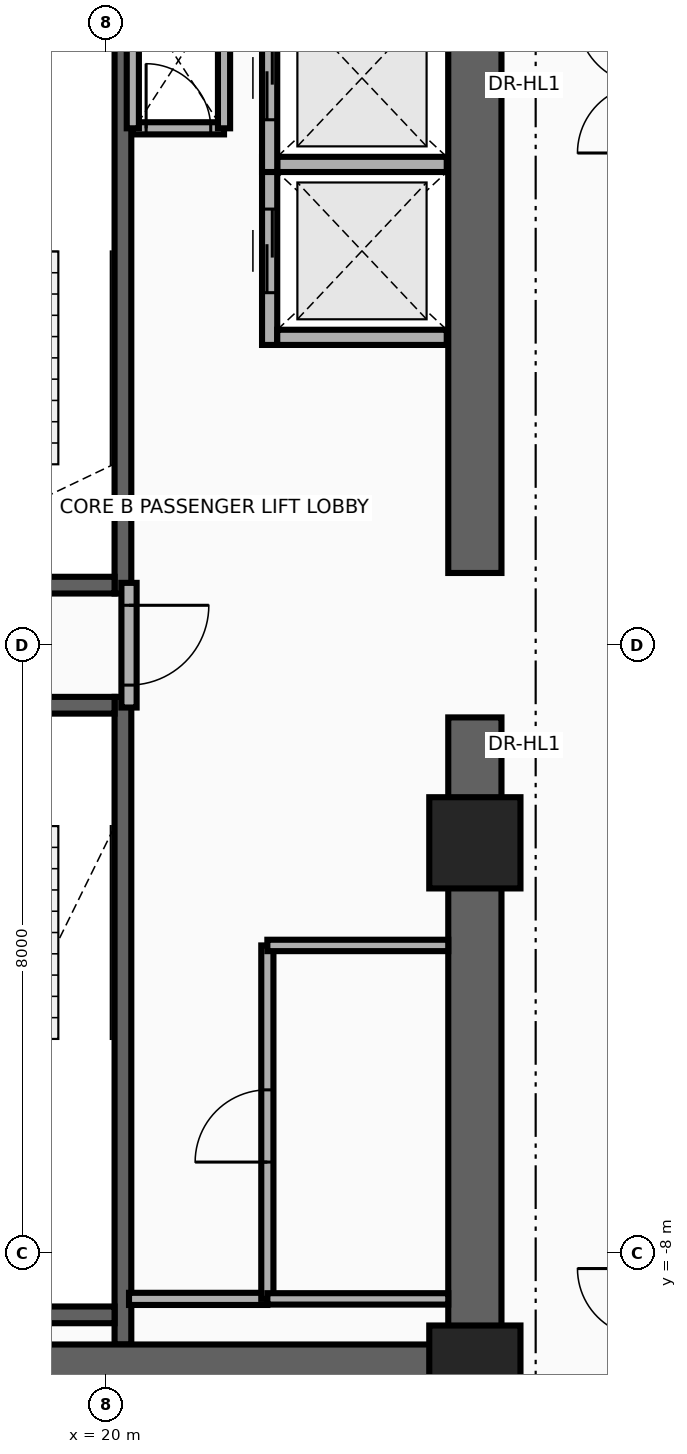
"""IFC4 building model, lengths in metres.
Left out: names, types, materials, properties, quantities, classifications, styles, units other than length and angle.
Written with IfcOpenShell. Run it as: python <this file> out.ifc"""

import sys

from ifc_helpers import new_model, si_unit, direction, frame, frame_2d, origin, origin_2d, place, context, subcontext, project, spatial, rectangle, extrude, source, transform, mapped, element, fill, save


model = new_model("IFC4")
c1 = context("Model", 3, precision=1e-05, world=origin(), true_north=direction((0.0, 1.0)))
c2 = subcontext(c1, "Body", "Model", "MODEL_VIEW")
j1 = project(units=[si_unit("LENGTHUNIT", "METRE"), si_unit("PLANEANGLEUNIT", "RADIAN")], contexts=[c1])
p1 = place(None, origin())
s1 = spatial("IfcSite", under=j1, at=p1, CompositionType="ELEMENT")
p2 = place(p1, origin())
s2 = spatial("IfcBuilding", under=s1, at=p2, CompositionType="ELEMENT")
p3 = place(p2, frame((0.0, 0.0, 127.9)))
s3 = spatial("IfcBuildingStorey", under=s2, at=p3, CompositionType="ELEMENT", Elevation=127.9)
p4 = place(p3, frame((20.22, 0.68, 0.0), z_axis=(0.0, 0.0, 1.0), x_axis=(0.0, 1.0, 0.0)))
e1 = element("IfcWall", 1, at=p4, inside=s3, PredefinedType="SHEAR", context=c2, shape_type="SweptSolid", body=[
    extrude(rectangle(XDim=8.52, YDim=0.22, at=frame_2d((4.26, 0.0))), origin(), (0.0, 0.0, 1.0), 3.46),
])
p5 = place(p3, frame((17.0, 0.79, 0.0), z_axis=(0.0, 0.0, 1.0), x_axis=(1.0, 0.0, 0.0)))
e2 = element("IfcWall", 2, at=p5, inside=s3, PredefinedType="SHEAR", context=c2, shape_type="SweptSolid", body=[
    extrude(rectangle(XDim=3.11, YDim=0.22, at=frame_2d((1.555, 0.0))), origin(), (0.0, 0.0, 1.0), 3.46),
])
p6 = place(p5, frame((0.95, 0.0, 0.0)))
e3 = element("IfcOpeningElement", 3, at=p6, cuts=e2, PredefinedType="OPENING", context=c2, shape_type="SweptSolid", body=[
    extrude(rectangle(XDim=1.1, YDim=2.15, at=frame_2d((0.55, 1.075))), frame((0.0, 0.125, 0.0), z_axis=(0.0, -1.0, 0.0), x_axis=(1.0, 0.0, 0.0)), (0.0, 0.0, 1.0), 0.25),
])
p7 = place(p3, frame((20.22, -9.2, 0.0), z_axis=(0.0, 0.0, 1.0), x_axis=(0.0, 1.0, 0.0)))
e4 = element("IfcWall", 4, at=p7, inside=s3, PredefinedType="SHEAR", context=c2, shape_type="SweptSolid", body=[
    extrude(rectangle(XDim=8.52, YDim=0.22, at=frame_2d((4.26, 0.0))), origin(), (0.0, 0.0, 1.0), 3.46),
])
p8 = place(p3, frame((17.0, -8.81, 0.0), z_axis=(0.0, 0.0, 1.0), x_axis=(1.0, 0.0, 0.0)))
e5 = element("IfcWall", 5, at=p8, inside=s3, PredefinedType="SHEAR", context=c2, shape_type="SweptSolid", body=[
    extrude(rectangle(XDim=3.11, YDim=0.22, at=frame_2d((1.555, 0.0))), origin(), (0.0, 0.0, 1.0), 3.46),
])
p9 = place(p3, frame((17.0, -0.79, 0.0), z_axis=(0.0, 0.0, 1.0), x_axis=(1.0, 0.0, 0.0)))
e6 = element("IfcWall", 6, at=p9, inside=s3, PredefinedType="SHEAR", context=c2, shape_type="SweptSolid", body=[
    extrude(rectangle(XDim=3.11, YDim=0.22, at=frame_2d((1.555, 0.0))), origin(), (0.0, 0.0, 1.0), 3.46),
])
p10 = place(p9, frame((0.95, 0.0, 0.0)))
e7 = element("IfcOpeningElement", 7, at=p10, cuts=e6, PredefinedType="OPENING", context=c2, shape_type="SweptSolid", body=[
    extrude(rectangle(XDim=1.1, YDim=2.15, at=frame_2d((0.55, 1.075))), frame((0.0, 0.125, 0.0), z_axis=(0.0, -1.0, 0.0), x_axis=(1.0, 0.0, 0.0)), (0.0, 0.0, 1.0), 0.25),
])
for number, where, z_axis, x_axis in (
    (8, (24.85, -9.9, 0.0), (0.0, 0.0, 1.0), (0.0, 1.0, 0.0)),
    (9, (24.85, 0.95, 0.0), (0.0, 0.0, 1.0), (0.0, 1.0, 0.0)),
):
    element("IfcWall", number, at=place(p3, frame(where, z_axis=z_axis, x_axis=x_axis)), inside=s3, PredefinedType="SHEAR", context=c2, shape_type="SweptSolid", body=[
        extrude(rectangle(XDim=8.95, YDim=0.7, at=frame_2d((4.475, 0.0))), origin(), (0.0, 0.0, 1.0), 3.46),
    ])
p11 = place(p3, frame((15.85, -9.55, 0.0), z_axis=(0.0, 0.0, 1.0), x_axis=(1.0, 0.0, 0.0)))
e10 = element("IfcWall", 10, at=p11, inside=s3, PredefinedType="SHEAR", context=c2, shape_type="SweptSolid", body=[
    extrude(rectangle(XDim=9.0, YDim=0.7, at=frame_2d((4.5, 0.0))), origin(), (0.0, 0.0, 1.0), 3.46),
])
m1 = source(origin(), c2, "Body", "SweptSolid", [
    extrude(rectangle(XDim=1.2, YDim=1.2, at=origin_2d()), origin(), (0.0, 0.0, 1.0), 3.7),
])
for number, where, z_axis, x_axis in (
    (11, (24.85, -9.55, 0.0), (0.0, 0.0, 1.0), (1.0, 0.0, 0.0)),
    (12, (24.85, -2.6, 0.0), (0.0, 0.0, 1.0), (1.0, 0.0, 0.0)),
):
    element("IfcColumn", number, at=place(p3, frame(where, z_axis=z_axis, x_axis=x_axis)), inside=s3, PredefinedType="COLUMN", context=c2, shape_type="MappedRepresentation", body=[
        mapped(m1, transform((0.0, 0.0, 0.0), x_axis=(1.0, 0.0, 0.0), y_axis=(0.0, 1.0, 0.0), z_axis=(0.0, 0.0, 1.0), scale=1.0)),
    ])
p12 = place(p3, frame((22.15, 3.95, 0.0), z_axis=(0.0, 0.0, 1.0), x_axis=(0.0, 1.0, 0.0)))
e13 = element("IfcWall", 13, at=p12, inside=s3, PredefinedType="MOVABLE", context=c2, shape_type="SweptSolid", body=[
    extrude(rectangle(XDim=2.475, YDim=0.2, at=frame_2d((1.238, 0.0))), origin(), (0.0, 0.0, 1.0), 3.46),
])
p13 = place(p12, frame((0.688, 0.0, 0.0)))
e14 = element("IfcOpeningElement", 14, at=p13, cuts=e13, PredefinedType="OPENING", context=c2, shape_type="SweptSolid", body=[
    extrude(rectangle(XDim=1.1, YDim=2.1, at=frame_2d((0.55, 1.05))), frame((0.0, 0.115, 0.0), z_axis=(0.0, -1.0, 0.0), x_axis=(1.0, 0.0, 0.0)), (0.0, 0.0, 1.0), 0.23),
])
for number, where, z_axis, x_axis in (
    (15, (22.25, 4.05, 0.0), (0.0, 0.0, 1.0), (1.0, 0.0, 0.0)),
    (16, (22.25, 6.325, 0.0), (0.0, 0.0, 1.0), (1.0, 0.0, 0.0)),
):
    element("IfcWall", number, at=place(p3, frame(where, z_axis=z_axis, x_axis=x_axis)), inside=s3, PredefinedType="MOVABLE", context=c2, shape_type="SweptSolid", body=[
        extrude(rectangle(XDim=2.23, YDim=0.2, at=frame_2d((1.115, 0.0))), origin(), (0.0, 0.0, 1.0), 2.245),
    ])
p14 = place(p3, frame((22.15, 6.225, 0.0), z_axis=(0.0, 0.0, 1.0), x_axis=(0.0, 1.0, 0.0)))
e17 = element("IfcWall", 17, at=p14, inside=s3, PredefinedType="MOVABLE", context=c2, shape_type="SweptSolid", body=[
    extrude(rectangle(XDim=2.475, YDim=0.2, at=frame_2d((1.237, 0.0))), origin(), (0.0, 0.0, 1.0), 3.46),
])
p15 = place(p14, frame((0.688, 0.0, 0.0)))
e18 = element("IfcOpeningElement", 18, at=p15, cuts=e17, PredefinedType="OPENING", context=c2, shape_type="SweptSolid", body=[
    extrude(rectangle(XDim=1.1, YDim=2.1, at=frame_2d((0.55, 1.05))), frame((0.0, 0.115, 0.0), z_axis=(0.0, -1.0, 0.0), x_axis=(1.0, 0.0, 0.0)), (0.0, 0.0, 1.0), 0.23),
])
p16 = place(p3, frame((20.3, -0.82, 0.0), z_axis=(0.0, 0.0, 1.0), x_axis=(0.0, 1.0, 0.0)))
e19 = element("IfcWall", 19, at=p16, inside=s3, PredefinedType="PARTITIONING", context=c2, shape_type="SweptSolid", body=[
    extrude(rectangle(XDim=1.64, YDim=0.2, at=frame_2d((0.82, 0.0))), origin(), (0.0, 0.0, 1.0), 3.46),
])
p17 = place(p16, frame((0.295, 0.0, 0.0)))
e20 = element("IfcOpeningElement", 20, at=p17, cuts=e19, PredefinedType="OPENING", context=c2, shape_type="SweptSolid", body=[
    extrude(rectangle(XDim=1.05, YDim=2.15, at=frame_2d((0.525, 1.075))), frame((0.0, 0.115, 0.0), z_axis=(0.0, -1.0, 0.0), x_axis=(1.0, 0.0, 0.0)), (0.0, 0.0, 1.0), 0.23),
])
p18 = place(p3, frame((20.35, 6.8, 0.0), z_axis=(0.0, 0.0, 1.0), x_axis=(1.0, 0.0, 0.0)))
e21 = element("IfcWall", 21, at=p18, inside=s3, PredefinedType="PARTITIONING", context=c2, shape_type="SweptSolid", body=[
    extrude(rectangle(XDim=1.2, YDim=0.16, at=frame_2d((0.6, 0.0))), origin(), (0.0, 0.0, 1.0), 3.46),
])
p19 = place(p18, frame((0.175, 0.0, 0.0)))
e22 = element("IfcOpeningElement", 22, at=p19, cuts=e21, PredefinedType="OPENING", context=c2, shape_type="SweptSolid", body=[
    extrude(rectangle(XDim=0.85, YDim=2.05, at=frame_2d((0.425, 1.025))), frame((0.0, 0.095, 0.0), z_axis=(0.0, -1.0, 0.0), x_axis=(1.0, 0.0, 0.0)), (0.0, 0.0, 1.0), 0.19),
])
for number, where, z_axis, x_axis in (
    (23, (21.55, 6.8, 0.0), (0.0, 0.0, 1.0), (0.0, 1.0, 0.0)),
    (24, (20.35, 6.8, 0.0), (0.0, 0.0, 1.0), (0.0, 1.0, 0.0)),
):
    element("IfcWall", number, at=place(p3, frame(where, z_axis=z_axis, x_axis=x_axis)), inside=s3, PredefinedType="PARTITIONING", context=c2, shape_type="SweptSolid", body=[
        extrude(rectangle(XDim=1.8, YDim=0.16, at=frame_2d((0.9, 0.0))), origin(), (0.0, 0.0, 1.0), 3.46),
    ])
p20 = place(p3, frame((20.3, -8.6, 0.0), z_axis=(0.0, 0.0, 1.0), x_axis=(1.0, 0.0, 0.0)))
e25 = element("IfcWall", 25, at=p20, inside=s3, PredefinedType="PARTITIONING", context=c2, shape_type="SweptSolid", body=[
    extrude(rectangle(XDim=1.82, YDim=0.16, at=frame_2d((0.91, 0.0))), origin(), (0.0, 0.0, 1.0), 3.46),
])
p21 = place(p3, frame((22.12, -8.6, 0.0), z_axis=(0.0, 0.0, 1.0), x_axis=(0.0, 1.0, 0.0)))
e26 = element("IfcWall", 26, at=p21, inside=s3, PredefinedType="PARTITIONING", context=c2, shape_type="SweptSolid", body=[
    extrude(rectangle(XDim=4.65, YDim=0.16, at=frame_2d((2.325, 0.0))), origin(), (0.0, 0.0, 1.0), 3.46),
])
p22 = place(p21, frame((1.8, 0.0, 0.0)))
e27 = element("IfcOpeningElement", 27, at=p22, cuts=e26, PredefinedType="OPENING", context=c2, shape_type="SweptSolid", body=[
    extrude(rectangle(XDim=0.95, YDim=2.15, at=frame_2d((0.475, 1.075))), frame((0.0, 0.095, 0.0), z_axis=(0.0, -1.0, 0.0), x_axis=(1.0, 0.0, 0.0)), (0.0, 0.0, 1.0), 0.19),
])
for number, where, z_axis, x_axis in (
    (28, (22.12, -3.95, 0.0), (0.0, 0.0, 1.0), (1.0, 0.0, 0.0)),
    (29, (22.12, -8.6, 0.0), (0.0, 0.0, 1.0), (1.0, 0.0, 0.0)),
):
    element("IfcWall", number, at=place(p3, frame(where, z_axis=z_axis, x_axis=x_axis)), inside=s3, PredefinedType="PARTITIONING", context=c2, shape_type="SweptSolid", body=[
        extrude(rectangle(XDim=2.38, YDim=0.15, at=frame_2d((1.19, 0.0))), origin(), (0.0, 0.0, 1.0), 3.46),
    ])
p23 = place(p13, origin())
e30 = element("IfcDoor", 30, at=p23, inside=s3, OperationType="DOUBLE_DOOR_SLIDING", PredefinedType="DOOR", context=c2, shape_type="SweptSolid", body=[
    extrude(rectangle(XDim=1.1, YDim=2.1, at=frame_2d((0.55, 1.05))), frame((0.0, 0.025, 0.0), z_axis=(0.0, -1.0, 0.0), x_axis=(1.0, 0.0, 0.0)), (0.0, 0.0, 1.0), 0.05),
])
fill(e14, e30)
p24 = place(p15, origin())
e31 = element("IfcDoor", 31, at=p24, inside=s3, OperationType="DOUBLE_DOOR_SLIDING", PredefinedType="DOOR", context=c2, shape_type="SweptSolid", body=[
    extrude(rectangle(XDim=1.1, YDim=2.1, at=frame_2d((0.55, 1.05))), frame((0.0, 0.025, 0.0), z_axis=(0.0, -1.0, 0.0), x_axis=(1.0, 0.0, 0.0)), (0.0, 0.0, 1.0), 0.05),
])
fill(e18, e31)
p25 = place(p17, frame((1.05, 0.0, 0.0), z_axis=(0.0, 0.0, 1.0), x_axis=(-1.0, 0.0, 0.0)))
e32 = element("IfcDoor", 32, at=p25, inside=s3, OperationType="SINGLE_SWING_LEFT", PredefinedType="DOOR", context=c2, shape_type="SweptSolid", body=[
    extrude(rectangle(XDim=1.05, YDim=2.15, at=frame_2d((0.525, 1.075))), frame((0.0, 0.025, 0.0), z_axis=(0.0, -1.0, 0.0), x_axis=(1.0, 0.0, 0.0)), (0.0, 0.0, 1.0), 0.05),
])
fill(e20, e32)
p26 = place(p19, origin())
e33 = element("IfcDoor", 33, at=p26, inside=s3, OperationType="SINGLE_SWING_RIGHT", PredefinedType="DOOR", context=c2, shape_type="SweptSolid", body=[
    extrude(rectangle(XDim=0.85, YDim=2.05, at=frame_2d((0.425, 1.025))), frame((0.0, 0.025, 0.0), z_axis=(0.0, -1.0, 0.0), x_axis=(1.0, 0.0, 0.0)), (0.0, 0.0, 1.0), 0.05),
])
fill(e22, e33)
p27 = place(p22, origin())
e34 = element("IfcDoor", 34, at=p27, inside=s3, OperationType="SINGLE_SWING_LEFT", PredefinedType="DOOR", context=c2, shape_type="SweptSolid", body=[
    extrude(rectangle(XDim=0.95, YDim=2.15, at=frame_2d((0.475, 1.075))), frame((0.0, 0.025, 0.0), z_axis=(0.0, -1.0, 0.0), x_axis=(1.0, 0.0, 0.0)), (0.0, 0.0, 1.0), 0.05),
])
fill(e27, e34)
save(model, sys.argv[1])
